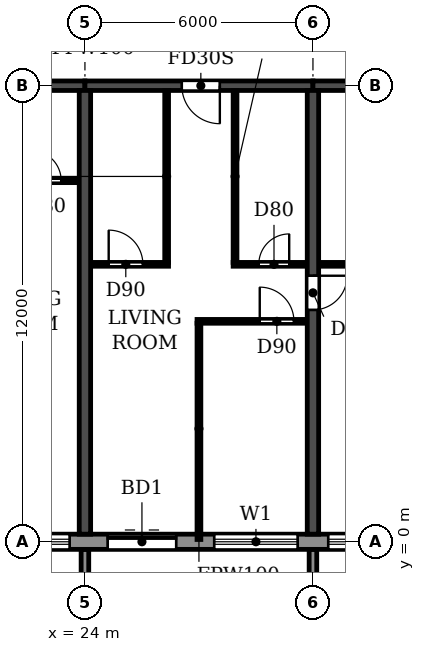
"""IFC4 building model, lengths in metres.
Left out: names, types, materials, properties, quantities, classifications, styles, units other than length and angle.
Written with IfcOpenShell. Run it as: python <this file> out.ifc"""

import sys

from ifc_helpers import new_model, si_unit, direction, frame, frame_2d, origin, place, context, subcontext, project, spatial, polyline, rectangle, outline, extrude, source, transform, mapped, element, fill, save


model = new_model("IFC4")
c1 = context("Model", 3, precision=1e-05, world=origin(), true_north=direction((0.0, 1.0)))
c2 = subcontext(c1, "Body", "Model", "MODEL_VIEW")
j1 = project(units=[si_unit("LENGTHUNIT", "METRE"), si_unit("PLANEANGLEUNIT", "RADIAN")], contexts=[c1])
p1 = place(None, origin())
s1 = spatial("IfcSite", under=j1, at=p1, CompositionType="ELEMENT")
p2 = place(p1, origin())
s2 = spatial("IfcBuilding", under=s1, at=p2, CompositionType="ELEMENT")
p3 = place(p2, frame((0.0, 0.0, 152.1)))
s3 = spatial("IfcBuildingStorey", under=s2, at=p3, CompositionType="ELEMENT", Elevation=152.1)
p4 = place(p3, frame((24.0, 0.2, 0.0), z_axis=(0.0, 0.0, 1.0), x_axis=(0.0, 1.0, 0.0)))
e1 = element("IfcWall", 1, at=p4, inside=s3, PredefinedType="SHEAR", context=c2, shape_type="SweptSolid", body=[
    extrude(rectangle(XDim=11.675, YDim=0.3, at=frame_2d((5.837, 0.0))), origin(), (0.0, 0.0, 1.0), 3.07),
])
p5 = place(p3, frame((30.0, 0.2, 0.0), z_axis=(0.0, 0.0, 1.0), x_axis=(0.0, 1.0, 0.0)))
e2 = element("IfcWall", 2, at=p5, inside=s3, PredefinedType="SHEAR", context=c2, shape_type="SweptSolid", body=[
    extrude(rectangle(XDim=11.675, YDim=0.3, at=frame_2d((5.837, 0.0))), origin(), (0.0, 0.0, 1.0), 3.07),
])
p6 = place(p5, frame((5.9, 0.0, 0.0)))
e3 = element("IfcOpeningElement", 3, at=p6, cuts=e2, PredefinedType="OPENING", context=c2, shape_type="SweptSolid", body=[
    extrude(rectangle(XDim=0.9, YDim=2.1, at=frame_2d((0.45, 1.05))), frame((0.0, 0.16, 0.0), z_axis=(0.0, -1.0, 0.0), x_axis=(1.0, 0.0, 0.0)), (0.0, 0.0, 1.0), 0.32),
])
p7 = place(p3, frame((18.0, 12.0, 0.0), z_axis=(0.0, 0.0, 1.0), x_axis=(1.0, 0.0, 0.0)))
e4 = element("IfcWall", 4, at=p7, inside=s3, PredefinedType="SHEAR", context=c2, shape_type="SweptSolid", body=[
    extrude(rectangle(XDim=6.0, YDim=0.25, at=frame_2d((3.0, 0.0))), origin(), (0.0, 0.0, 1.0), 2.47),
])
p8 = place(p7, frame((2.55, 0.0, 0.0)))
e5 = element("IfcOpeningElement", 5, at=p8, cuts=e4, PredefinedType="OPENING", context=c2, shape_type="SweptSolid", body=[
    extrude(rectangle(XDim=1.0, YDim=2.1, at=frame_2d((0.5, 1.05))), frame((0.0, 0.135, 0.0), z_axis=(0.0, -1.0, 0.0), x_axis=(1.0, 0.0, 0.0)), (0.0, 0.0, 1.0), 0.27),
])
p9 = place(p3, frame((24.0, 12.0, 0.0), z_axis=(0.0, 0.0, 1.0), x_axis=(1.0, 0.0, 0.0)))
e6 = element("IfcWall", 6, at=p9, inside=s3, PredefinedType="SHEAR", context=c2, shape_type="SweptSolid", body=[
    extrude(rectangle(XDim=6.0, YDim=0.25, at=frame_2d((3.0, 0.0))), origin(), (0.0, 0.0, 1.0), 2.47),
])
p10 = place(p9, frame((2.55, 0.0, 0.0)))
e7 = element("IfcOpeningElement", 7, at=p10, cuts=e6, PredefinedType="OPENING", context=c2, shape_type="SweptSolid", body=[
    extrude(rectangle(XDim=1.0, YDim=2.1, at=frame_2d((0.5, 1.05))), frame((0.0, 0.135, 0.0), z_axis=(0.0, -1.0, 0.0), x_axis=(1.0, 0.0, 0.0)), (0.0, 0.0, 1.0), 0.27),
])
p11 = place(p3, frame((30.0, 12.0, 0.0), z_axis=(0.0, 0.0, 1.0), x_axis=(1.0, 0.0, 0.0)))
e8 = element("IfcWall", 8, at=p11, inside=s3, PredefinedType="SHEAR", context=c2, shape_type="SweptSolid", body=[
    extrude(rectangle(XDim=6.0, YDim=0.25, at=frame_2d((3.0, 0.0))), origin(), (0.0, 0.0, 1.0), 2.47),
])
p12 = place(p3, frame((16.683, 0.0, 0.0), z_axis=(0.0, 0.0, 1.0), x_axis=(1.0, 0.0, 0.0)))
e9 = element("IfcWall", 9, at=p12, inside=s3, PredefinedType="STANDARD", context=c2, shape_type="SweptSolid", body=[
    extrude(rectangle(XDim=68.634, YDim=0.4, at=frame_2d((34.317, 0.0))), origin(), (0.0, 0.0, 1.0), 3.07),
])
p13 = place(p12, frame((1.717, 0.0, 0.9)))
e10 = element("IfcOpeningElement", 10, at=p13, cuts=e9, PredefinedType="OPENING", context=c2, shape_type="SweptSolid", body=[
    extrude(rectangle(XDim=2.2, YDim=1.5, at=frame_2d((1.1, 0.75))), frame((0.0, 0.21, 0.0), z_axis=(0.0, -1.0, 0.0), x_axis=(1.0, 0.0, 0.0)), (0.0, 0.0, 1.0), 0.42),
])
p14 = place(p12, frame((4.717, 0.0, 0.9)))
e11 = element("IfcOpeningElement", 11, at=p14, cuts=e9, PredefinedType="OPENING", context=c2, shape_type="SweptSolid", body=[
    extrude(rectangle(XDim=2.2, YDim=1.5, at=frame_2d((1.1, 0.75))), frame((0.0, 0.21, 0.0), z_axis=(0.0, -1.0, 0.0), x_axis=(1.0, 0.0, 0.0)), (0.0, 0.0, 1.0), 0.42),
])
p15 = place(p12, frame((7.917, 0.0, 0.0)))
e12 = element("IfcOpeningElement", 12, at=p15, cuts=e9, PredefinedType="OPENING", context=c2, shape_type="SweptSolid", body=[
    extrude(rectangle(XDim=1.8, YDim=2.4, at=frame_2d((0.9, 1.2))), frame((0.0, 0.21, 0.0), z_axis=(0.0, -1.0, 0.0), x_axis=(1.0, 0.0, 0.0)), (0.0, 0.0, 1.0), 0.42),
])
p16 = place(p12, frame((10.717, 0.0, 0.9)))
e13 = element("IfcOpeningElement", 13, at=p16, cuts=e9, PredefinedType="OPENING", context=c2, shape_type="SweptSolid", body=[
    extrude(rectangle(XDim=2.2, YDim=1.5, at=frame_2d((1.1, 0.75))), frame((0.0, 0.21, 0.0), z_axis=(0.0, -1.0, 0.0), x_axis=(1.0, 0.0, 0.0)), (0.0, 0.0, 1.0), 0.42),
])
p17 = place(p12, frame((13.717, 0.0, 0.9)))
e14 = element("IfcOpeningElement", 14, at=p17, cuts=e9, PredefinedType="OPENING", context=c2, shape_type="SweptSolid", body=[
    extrude(rectangle(XDim=2.2, YDim=1.5, at=frame_2d((1.1, 0.75))), frame((0.0, 0.21, 0.0), z_axis=(0.0, -1.0, 0.0), x_axis=(1.0, 0.0, 0.0)), (0.0, 0.0, 1.0), 0.42),
])
p18 = place(p12, frame((16.717, 0.0, 0.9)))
e15 = element("IfcOpeningElement", 15, at=p18, cuts=e9, PredefinedType="OPENING", context=c2, shape_type="SweptSolid", body=[
    extrude(rectangle(XDim=2.2, YDim=1.5, at=frame_2d((1.1, 0.75))), frame((0.0, 0.21, 0.0), z_axis=(0.0, -1.0, 0.0), x_axis=(1.0, 0.0, 0.0)), (0.0, 0.0, 1.0), 0.42),
])
p19 = place(p12, frame((19.717, 0.0, 0.9)))
e16 = element("IfcOpeningElement", 16, at=p19, cuts=e9, PredefinedType="OPENING", context=c2, shape_type="SweptSolid", body=[
    extrude(rectangle(XDim=2.2, YDim=1.5, at=frame_2d((1.1, 0.75))), frame((0.0, 0.21, 0.0), z_axis=(0.0, -1.0, 0.0), x_axis=(1.0, 0.0, 0.0)), (0.0, 0.0, 1.0), 0.42),
])
p20 = place(p12, frame((22.917, 0.0, 0.0)))
e17 = element("IfcOpeningElement", 17, at=p20, cuts=e9, PredefinedType="OPENING", context=c2, shape_type="SweptSolid", body=[
    extrude(rectangle(XDim=1.8, YDim=2.4, at=frame_2d((0.9, 1.2))), frame((0.0, 0.21, 0.0), z_axis=(0.0, -1.0, 0.0), x_axis=(1.0, 0.0, 0.0)), (0.0, 0.0, 1.0), 0.42),
])
p21 = place(p12, frame((25.717, 0.0, 0.9)))
e18 = element("IfcOpeningElement", 18, at=p21, cuts=e9, PredefinedType="OPENING", context=c2, shape_type="SweptSolid", body=[
    extrude(rectangle(XDim=2.2, YDim=1.5, at=frame_2d((1.1, 0.75))), frame((0.0, 0.21, 0.0), z_axis=(0.0, -1.0, 0.0), x_axis=(1.0, 0.0, 0.0)), (0.0, 0.0, 1.0), 0.42),
])
p22 = place(p12, frame((28.717, 0.0, 0.9)))
e19 = element("IfcOpeningElement", 19, at=p22, cuts=e9, PredefinedType="OPENING", context=c2, shape_type="SweptSolid", body=[
    extrude(rectangle(XDim=2.2, YDim=1.5, at=frame_2d((1.1, 0.75))), frame((0.0, 0.21, 0.0), z_axis=(0.0, -1.0, 0.0), x_axis=(1.0, 0.0, 0.0)), (0.0, 0.0, 1.0), 0.42),
])
p23 = place(p12, frame((31.917, 0.0, 0.0)))
e20 = element("IfcOpeningElement", 20, at=p23, cuts=e9, PredefinedType="OPENING", context=c2, shape_type="SweptSolid", body=[
    extrude(rectangle(XDim=1.8, YDim=2.4, at=frame_2d((0.9, 1.2))), frame((0.0, 0.21, 0.0), z_axis=(0.0, -1.0, 0.0), x_axis=(1.0, 0.0, 0.0)), (0.0, 0.0, 1.0), 0.42),
])
p24 = place(p12, frame((34.717, 0.0, 0.9)))
e21 = element("IfcOpeningElement", 21, at=p24, cuts=e9, PredefinedType="OPENING", context=c2, shape_type="SweptSolid", body=[
    extrude(rectangle(XDim=2.2, YDim=1.5, at=frame_2d((1.1, 0.75))), frame((0.0, 0.21, 0.0), z_axis=(0.0, -1.0, 0.0), x_axis=(1.0, 0.0, 0.0)), (0.0, 0.0, 1.0), 0.42),
])
p25 = place(p12, frame((37.717, 0.0, 0.9)))
e22 = element("IfcOpeningElement", 22, at=p25, cuts=e9, PredefinedType="OPENING", context=c2, shape_type="SweptSolid", body=[
    extrude(rectangle(XDim=2.2, YDim=1.5, at=frame_2d((1.1, 0.75))), frame((0.0, 0.21, 0.0), z_axis=(0.0, -1.0, 0.0), x_axis=(1.0, 0.0, 0.0)), (0.0, 0.0, 1.0), 0.42),
])
p26 = place(p12, frame((40.717, 0.0, 0.9)))
e23 = element("IfcOpeningElement", 23, at=p26, cuts=e9, PredefinedType="OPENING", context=c2, shape_type="SweptSolid", body=[
    extrude(rectangle(XDim=2.2, YDim=1.5, at=frame_2d((1.1, 0.75))), frame((0.0, 0.21, 0.0), z_axis=(0.0, -1.0, 0.0), x_axis=(1.0, 0.0, 0.0)), (0.0, 0.0, 1.0), 0.42),
])
p27 = place(p12, frame((43.717, 0.0, 0.9)))
e24 = element("IfcOpeningElement", 24, at=p27, cuts=e9, PredefinedType="OPENING", context=c2, shape_type="SweptSolid", body=[
    extrude(rectangle(XDim=2.2, YDim=1.5, at=frame_2d((1.1, 0.75))), frame((0.0, 0.21, 0.0), z_axis=(0.0, -1.0, 0.0), x_axis=(1.0, 0.0, 0.0)), (0.0, 0.0, 1.0), 0.42),
])
p28 = place(p12, frame((46.917, 0.0, 0.0)))
e25 = element("IfcOpeningElement", 25, at=p28, cuts=e9, PredefinedType="OPENING", context=c2, shape_type="SweptSolid", body=[
    extrude(rectangle(XDim=1.8, YDim=2.4, at=frame_2d((0.9, 1.2))), frame((0.0, 0.21, 0.0), z_axis=(0.0, -1.0, 0.0), x_axis=(1.0, 0.0, 0.0)), (0.0, 0.0, 1.0), 0.42),
])
p29 = place(p12, frame((49.717, 0.0, 0.9)))
e26 = element("IfcOpeningElement", 26, at=p29, cuts=e9, PredefinedType="OPENING", context=c2, shape_type="SweptSolid", body=[
    extrude(rectangle(XDim=2.2, YDim=1.5, at=frame_2d((1.1, 0.75))), frame((0.0, 0.21, 0.0), z_axis=(0.0, -1.0, 0.0), x_axis=(1.0, 0.0, 0.0)), (0.0, 0.0, 1.0), 0.42),
])
p30 = place(p12, frame((52.717, 0.0, 0.9)))
e27 = element("IfcOpeningElement", 27, at=p30, cuts=e9, PredefinedType="OPENING", context=c2, shape_type="SweptSolid", body=[
    extrude(rectangle(XDim=2.2, YDim=1.5, at=frame_2d((1.1, 0.75))), frame((0.0, 0.21, 0.0), z_axis=(0.0, -1.0, 0.0), x_axis=(1.0, 0.0, 0.0)), (0.0, 0.0, 1.0), 0.42),
])
p31 = place(p12, frame((55.717, 0.0, 0.9)))
e28 = element("IfcOpeningElement", 28, at=p31, cuts=e9, PredefinedType="OPENING", context=c2, shape_type="SweptSolid", body=[
    extrude(rectangle(XDim=2.2, YDim=1.5, at=frame_2d((1.1, 0.75))), frame((0.0, 0.21, 0.0), z_axis=(0.0, -1.0, 0.0), x_axis=(1.0, 0.0, 0.0)), (0.0, 0.0, 1.0), 0.42),
])
p32 = place(p12, frame((58.917, 0.0, 0.0)))
e29 = element("IfcOpeningElement", 29, at=p32, cuts=e9, PredefinedType="OPENING", context=c2, shape_type="SweptSolid", body=[
    extrude(rectangle(XDim=1.8, YDim=2.4, at=frame_2d((0.9, 1.2))), frame((0.0, 0.21, 0.0), z_axis=(0.0, -1.0, 0.0), x_axis=(1.0, 0.0, 0.0)), (0.0, 0.0, 1.0), 0.42),
])
p33 = place(p12, frame((61.717, 0.0, 0.9)))
e30 = element("IfcOpeningElement", 30, at=p33, cuts=e9, PredefinedType="OPENING", context=c2, shape_type="SweptSolid", body=[
    extrude(rectangle(XDim=2.2, YDim=1.5, at=frame_2d((1.1, 0.75))), frame((0.0, 0.21, 0.0), z_axis=(0.0, -1.0, 0.0), x_axis=(1.0, 0.0, 0.0)), (0.0, 0.0, 1.0), 0.42),
])
p34 = place(p12, frame((64.717, 0.0, 0.9)))
e31 = element("IfcOpeningElement", 31, at=p34, cuts=e9, PredefinedType="OPENING", context=c2, shape_type="SweptSolid", body=[
    extrude(rectangle(XDim=2.2, YDim=1.5, at=frame_2d((1.1, 0.75))), frame((0.0, 0.21, 0.0), z_axis=(0.0, -1.0, 0.0), x_axis=(1.0, 0.0, 0.0)), (0.0, 0.0, 1.0), 0.42),
])
m1 = source(origin(), c2, "Body", "SweptSolid", [
    extrude(outline(polyline([(0.0, 0.0), (0.2, 0.0), (0.2, 1.65), (0.0, 1.65), (0.0, 0.0)])), origin(), (0.0, 0.0, 1.0), 3.1),
])
for number, where in (
    (32, (23.9, -1.85, 0.0)),
    (33, (29.9, -1.85, 0.0)),
):
    element("IfcWall", number, at=place(p3, frame(where)), inside=s3, PredefinedType="STANDARD", context=c2, shape_type="MappedRepresentation", body=[
        mapped(m1, transform((0.0, 0.0, 0.0))),
    ])
p35 = place(p3, frame((26.95, 5.8, 0.0), z_axis=(0.0, 0.0, 1.0), x_axis=(1.0, 0.0, 0.0)))
e34 = element("IfcWall", 34, at=p35, inside=s3, PredefinedType="PARTITIONING", context=c2, shape_type="SweptSolid", body=[
    extrude(rectangle(XDim=2.89, YDim=0.1, at=frame_2d((1.445, 0.0))), origin(), (0.0, 0.0, 1.0), 3.07),
])
p36 = place(p35, frame((1.65, 0.0, 0.0)))
e35 = element("IfcOpeningElement", 35, at=p36, cuts=e34, PredefinedType="OPENING", context=c2, shape_type="SweptSolid", body=[
    extrude(rectangle(XDim=0.9, YDim=2.1, at=frame_2d((0.45, 1.05))), frame((0.0, 0.06, 0.0), z_axis=(0.0, -1.0, 0.0), x_axis=(1.0, 0.0, 0.0)), (0.0, 0.0, 1.0), 0.12),
])
p37 = place(p3, frame((24.16, 7.3, 0.0), z_axis=(0.0, 0.0, 1.0), x_axis=(1.0, 0.0, 0.0)))
e36 = element("IfcWall", 36, at=p37, inside=s3, PredefinedType="PARTITIONING", context=c2, shape_type="SweptSolid", body=[
    extrude(rectangle(XDim=2.04, YDim=0.1, at=frame_2d((1.02, 0.0))), origin(), (0.0, 0.0, 1.0), 3.07),
])
p38 = place(p37, frame((0.465, 0.0, 0.0)))
e37 = element("IfcOpeningElement", 37, at=p38, cuts=e36, PredefinedType="OPENING", context=c2, shape_type="SweptSolid", body=[
    extrude(rectangle(XDim=0.9, YDim=2.1, at=frame_2d((0.45, 1.05))), frame((0.0, 0.06, 0.0), z_axis=(0.0, -1.0, 0.0), x_axis=(1.0, 0.0, 0.0)), (0.0, 0.0, 1.0), 0.12),
])
p39 = place(p3, frame((27.9, 7.3, 0.0), z_axis=(0.0, 0.0, 1.0), x_axis=(1.0, 0.0, 0.0)))
e38 = element("IfcWall", 38, at=p39, inside=s3, PredefinedType="PARTITIONING", context=c2, shape_type="SweptSolid", body=[
    extrude(rectangle(XDim=1.94, YDim=0.1, at=frame_2d((0.97, 0.0))), origin(), (0.0, 0.0, 1.0), 3.07),
])
p40 = place(p39, frame((0.675, 0.0, 0.0)))
e39 = element("IfcOpeningElement", 39, at=p40, cuts=e38, PredefinedType="OPENING", context=c2, shape_type="SweptSolid", body=[
    extrude(rectangle(XDim=0.8, YDim=2.1, at=frame_2d((0.4, 1.05))), frame((0.0, 0.06, 0.0), z_axis=(0.0, -1.0, 0.0), x_axis=(1.0, 0.0, 0.0)), (0.0, 0.0, 1.0), 0.12),
])
p41 = place(p3, frame((30.16, 7.3, 0.0), z_axis=(0.0, 0.0, 1.0), x_axis=(1.0, 0.0, 0.0)))
e40 = element("IfcWall", 40, at=p41, inside=s3, PredefinedType="PARTITIONING", context=c2, shape_type="SweptSolid", body=[
    extrude(rectangle(XDim=2.94, YDim=0.1, at=frame_2d((1.47, 0.0))), origin(), (0.0, 0.0, 1.0), 3.07),
])
p42 = place(p41, frame((0.94, 0.0, 0.0)))
e41 = element("IfcOpeningElement", 41, at=p42, cuts=e40, PredefinedType="OPENING", context=c2, shape_type="SweptSolid", body=[
    extrude(rectangle(XDim=0.8, YDim=2.1, at=frame_2d((0.4, 1.05))), frame((0.0, 0.06, 0.0), z_axis=(0.0, -1.0, 0.0), x_axis=(1.0, 0.0, 0.0)), (0.0, 0.0, 1.0), 0.12),
])
p43 = place(p3, frame((21.9, 9.5, 0.0), z_axis=(0.0, 0.0, 1.0), x_axis=(1.0, 0.0, 0.0)))
e42 = element("IfcWall", 42, at=p43, inside=s3, PredefinedType="PARTITIONING", context=c2, shape_type="SweptSolid", body=[
    extrude(rectangle(XDim=1.94, YDim=0.1, at=frame_2d((0.97, 0.0))), origin(), (0.0, 0.0, 1.0), 3.07),
])
p44 = place(p43, frame((0.675, 0.0, 0.0)))
e43 = element("IfcOpeningElement", 43, at=p44, cuts=e42, PredefinedType="OPENING", context=c2, shape_type="SweptSolid", body=[
    extrude(rectangle(XDim=0.8, YDim=2.1, at=frame_2d((0.4, 1.05))), frame((0.0, 0.06, 0.0), z_axis=(0.0, -1.0, 0.0), x_axis=(1.0, 0.0, 0.0)), (0.0, 0.0, 1.0), 0.12),
])
p45 = place(p3, frame((26.15, 7.35, 0.0), z_axis=(0.0, 0.0, 1.0), x_axis=(0.0, 1.0, 0.0)))
e44 = element("IfcWall", 44, at=p45, inside=s3, PredefinedType="PARTITIONING", context=c2, shape_type="SweptSolid", body=[
    extrude(rectangle(XDim=4.515, YDim=0.1, at=frame_2d((2.257, 0.0))), origin(), (0.0, 0.0, 1.0), 3.07),
])
p46 = place(p3, frame((27.0, 0.06, 0.0), z_axis=(0.0, 0.0, 1.0), x_axis=(0.0, 1.0, 0.0)))
e45 = element("IfcWall", 45, at=p46, inside=s3, PredefinedType="PARTITIONING", context=c2, shape_type="SweptSolid", body=[
    extrude(rectangle(XDim=5.69, YDim=0.1, at=frame_2d((2.845, 0.0))), origin(), (0.0, 0.0, 1.0), 3.07),
])
p47 = place(p3, frame((27.95, 7.35, 0.0), z_axis=(0.0, 0.0, 1.0), x_axis=(0.0, 1.0, 0.0)))
e46 = element("IfcWall", 46, at=p47, inside=s3, PredefinedType="PARTITIONING", context=c2, shape_type="SweptSolid", body=[
    extrude(rectangle(XDim=4.515, YDim=0.1, at=frame_2d((2.257, 0.0))), origin(), (0.0, 0.0, 1.0), 3.07),
])
p48 = place(p14, origin())
e47 = element("IfcWindow", 47, at=p48, inside=s3, PartitioningType="DOUBLE_PANEL_HORIZONTAL", PredefinedType="WINDOW", context=c2, shape_type="SweptSolid", body=[
    extrude(rectangle(XDim=2.2, YDim=1.5, at=frame_2d((1.1, 0.75))), frame((0.0, 0.03, 0.0), z_axis=(0.0, -1.0, 0.0), x_axis=(1.0, 0.0, 0.0)), (0.0, 0.0, 1.0), 0.06),
])
fill(e11, e47)
p49 = place(p15, origin())
e48 = element("IfcDoor", 48, at=p49, inside=s3, OperationType="DOUBLE_DOOR_SLIDING", PredefinedType="DOOR", context=c2, shape_type="SweptSolid", body=[
    extrude(rectangle(XDim=1.8, YDim=2.4, at=frame_2d((0.9, 1.2))), frame((0.0, 0.025, 0.0), z_axis=(0.0, -1.0, 0.0), x_axis=(1.0, 0.0, 0.0)), (0.0, 0.0, 1.0), 0.05),
])
fill(e12, e48)
p50 = place(p16, origin())
e49 = element("IfcWindow", 49, at=p50, inside=s3, PartitioningType="DOUBLE_PANEL_HORIZONTAL", PredefinedType="WINDOW", context=c2, shape_type="SweptSolid", body=[
    extrude(rectangle(XDim=2.2, YDim=1.5, at=frame_2d((1.1, 0.75))), frame((0.0, 0.03, 0.0), z_axis=(0.0, -1.0, 0.0), x_axis=(1.0, 0.0, 0.0)), (0.0, 0.0, 1.0), 0.06),
])
fill(e13, e49)
p51 = place(p17, origin())
e50 = element("IfcWindow", 50, at=p51, inside=s3, PartitioningType="DOUBLE_PANEL_HORIZONTAL", PredefinedType="WINDOW", context=c2, shape_type="SweptSolid", body=[
    extrude(rectangle(XDim=2.2, YDim=1.5, at=frame_2d((1.1, 0.75))), frame((0.0, 0.03, 0.0), z_axis=(0.0, -1.0, 0.0), x_axis=(1.0, 0.0, 0.0)), (0.0, 0.0, 1.0), 0.06),
])
fill(e14, e50)
p52 = place(p44, origin())
e51 = element("IfcDoor", 51, at=p52, inside=s3, OperationType="SINGLE_SWING_LEFT", PredefinedType="DOOR", context=c2, shape_type="SweptSolid", body=[
    extrude(rectangle(XDim=0.8, YDim=2.1, at=frame_2d((0.4, 1.05))), frame((0.0, 0.025, 0.0), z_axis=(0.0, -1.0, 0.0), x_axis=(1.0, 0.0, 0.0)), (0.0, 0.0, 1.0), 0.05),
])
fill(e43, e51)
p53 = place(p38, origin())
e52 = element("IfcDoor", 52, at=p53, inside=s3, OperationType="SINGLE_SWING_LEFT", PredefinedType="DOOR", context=c2, shape_type="SweptSolid", body=[
    extrude(rectangle(XDim=0.9, YDim=2.1, at=frame_2d((0.45, 1.05))), frame((0.0, 0.025, 0.0), z_axis=(0.0, -1.0, 0.0), x_axis=(1.0, 0.0, 0.0)), (0.0, 0.0, 1.0), 0.05),
])
fill(e37, e52)
p54 = place(p10, frame((1.0, 0.0, 0.0), z_axis=(0.0, 0.0, 1.0), x_axis=(-1.0, 0.0, 0.0)))
e53 = element("IfcDoor", 53, at=p54, inside=s3, OperationType="SINGLE_SWING_LEFT", PredefinedType="DOOR", context=c2, shape_type="SweptSolid", body=[
    extrude(rectangle(XDim=1.0, YDim=2.1, at=frame_2d((0.5, 1.05))), frame((0.0, 0.025, 0.0), z_axis=(0.0, -1.0, 0.0), x_axis=(1.0, 0.0, 0.0)), (0.0, 0.0, 1.0), 0.05),
])
fill(e7, e53)
p55 = place(p40, origin())
e54 = element("IfcDoor", 54, at=p55, inside=s3, OperationType="SINGLE_SWING_RIGHT", PredefinedType="DOOR", context=c2, shape_type="SweptSolid", body=[
    extrude(rectangle(XDim=0.8, YDim=2.1, at=frame_2d((0.4, 1.05))), frame((0.0, 0.025, 0.0), z_axis=(0.0, -1.0, 0.0), x_axis=(1.0, 0.0, 0.0)), (0.0, 0.0, 1.0), 0.05),
])
fill(e39, e54)
p56 = place(p36, origin())
e55 = element("IfcDoor", 55, at=p56, inside=s3, OperationType="SINGLE_SWING_LEFT", PredefinedType="DOOR", context=c2, shape_type="SweptSolid", body=[
    extrude(rectangle(XDim=0.9, YDim=2.1, at=frame_2d((0.45, 1.05))), frame((0.0, 0.025, 0.0), z_axis=(0.0, -1.0, 0.0), x_axis=(1.0, 0.0, 0.0)), (0.0, 0.0, 1.0), 0.05),
])
fill(e35, e55)
p57 = place(p6, frame((0.9, 0.0, 0.0), z_axis=(0.0, 0.0, 1.0), x_axis=(-1.0, 0.0, 0.0)))
e56 = element("IfcDoor", 56, at=p57, inside=s3, OperationType="SINGLE_SWING_LEFT", PredefinedType="DOOR", context=c2, shape_type="SweptSolid", body=[
    extrude(rectangle(XDim=0.9, YDim=2.1, at=frame_2d((0.45, 1.05))), frame((0.0, 0.025, 0.0), z_axis=(0.0, -1.0, 0.0), x_axis=(1.0, 0.0, 0.0)), (0.0, 0.0, 1.0), 0.05),
])
fill(e3, e56)
save(model, sys.argv[1])
